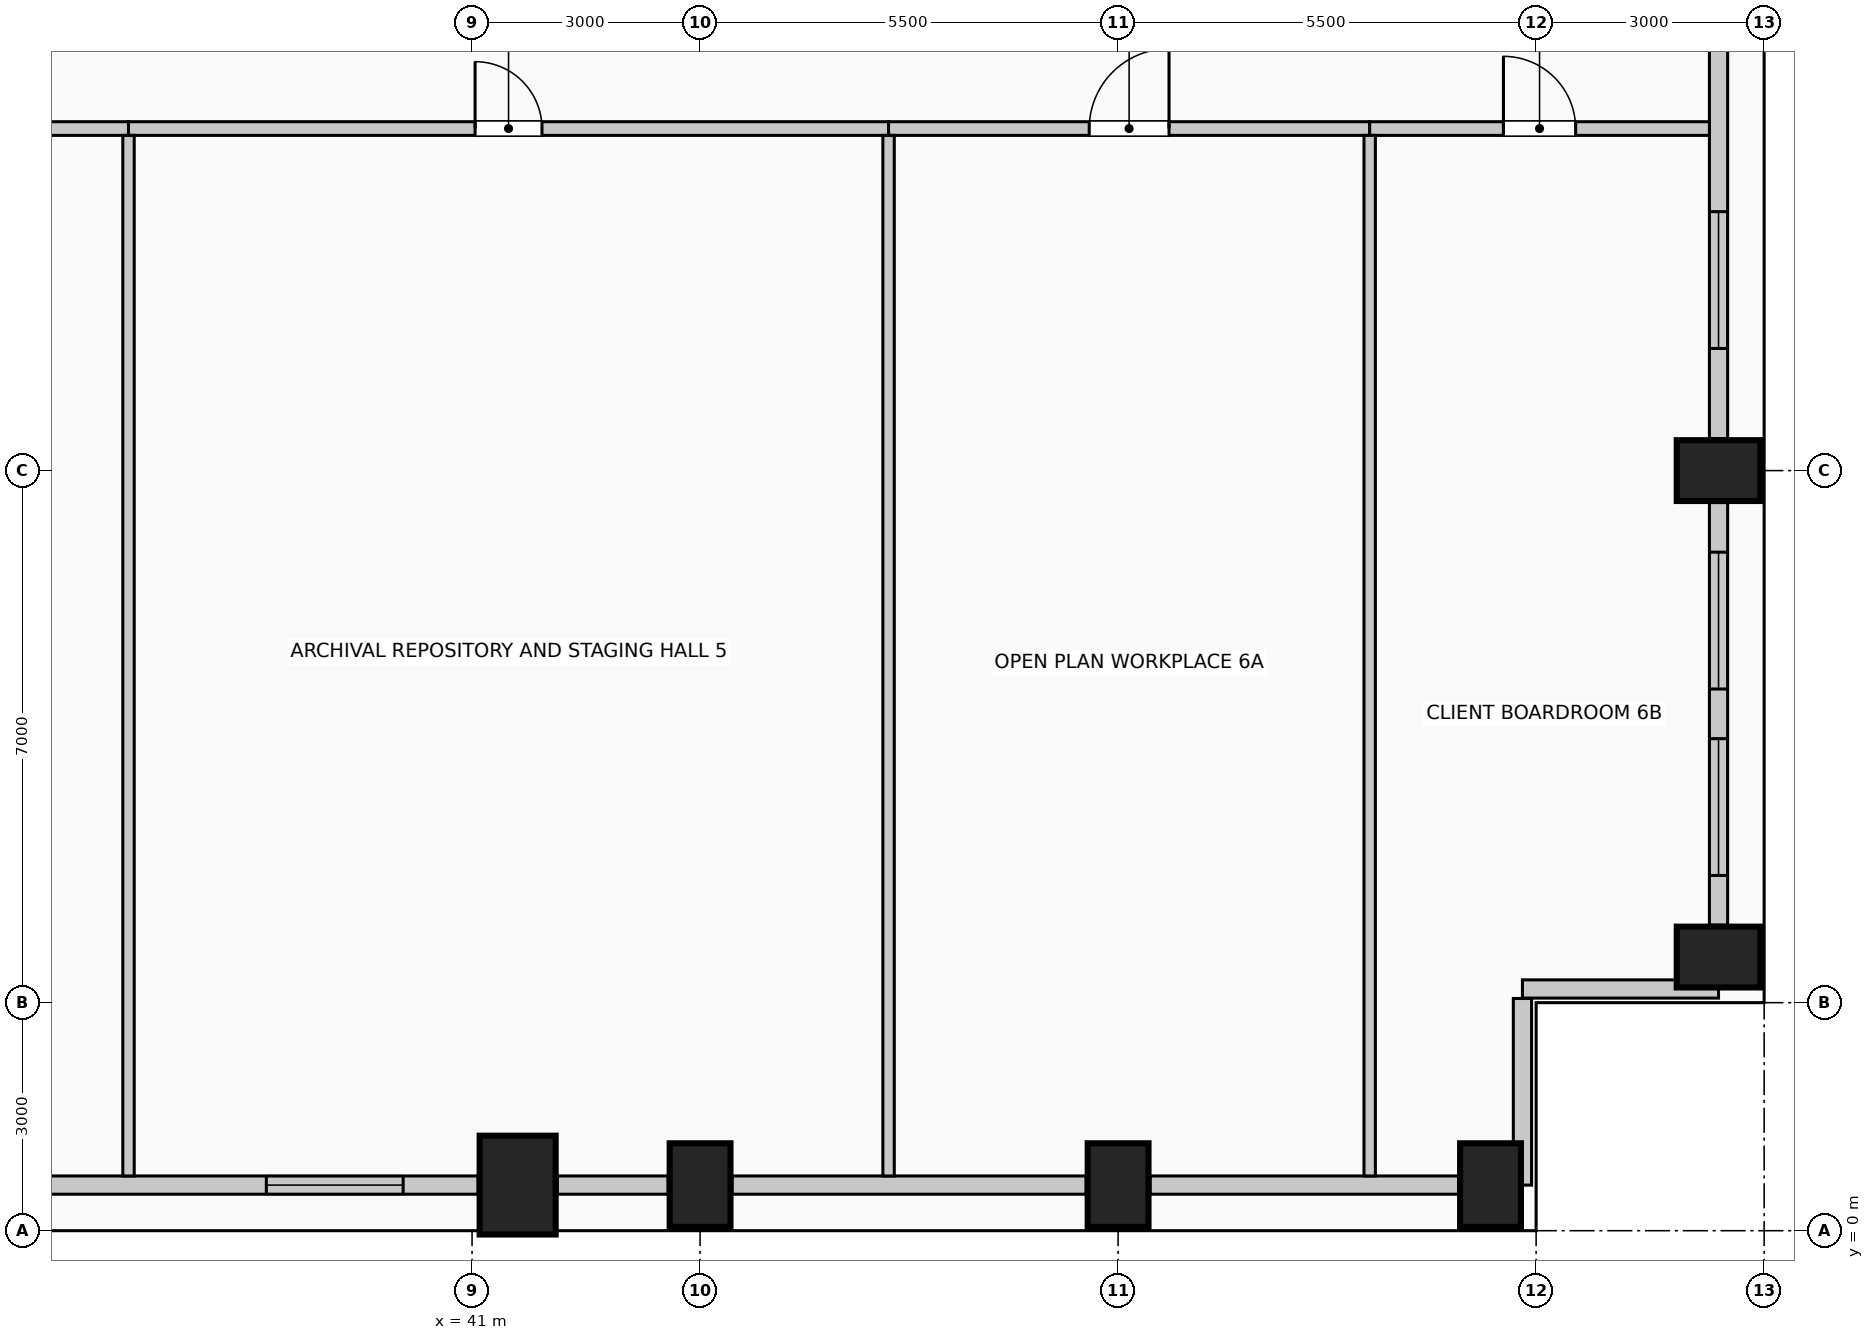
"""IFC4 building model, lengths in metres.
Left out: names, types, materials, properties, quantities, classifications, styles, units other than length and angle.
Written with IfcOpenShell. Run it as: python <this file> out.ifc"""

import sys

from ifc_helpers import new_model, si_unit, direction, frame, frame_2d, origin, origin_2d, place, context, subcontext, project, spatial, rectangle, extrude, element, fill, save


model = new_model("IFC4")
c1 = context("Model", 3, precision=1e-05, world=origin(), true_north=direction((0.0, 1.0)))
c2 = subcontext(c1, "Body", "Model", "MODEL_VIEW")
j1 = project(units=[si_unit("LENGTHUNIT", "METRE"), si_unit("PLANEANGLEUNIT", "RADIAN")], contexts=[c1])
p1 = place(None, origin())
s1 = spatial("IfcSite", under=j1, at=p1, CompositionType="ELEMENT")
p2 = place(p1, origin())
s2 = spatial("IfcBuilding", under=s1, at=p2, CompositionType="ELEMENT")
p3 = place(p2, frame((0.0, 0.0, 206.6)))
s3 = spatial("IfcBuildingStorey", under=s2, at=p3, CompositionType="ELEMENT", Elevation=206.6)
p4 = place(p3, frame((41.6, 0.6, 0.0), z_axis=(0.0, 0.0, 1.0), x_axis=(1.0, 0.0, 0.0)))
e1 = element("IfcColumn", 1, at=p4, inside=s3, PredefinedType="COLUMN", context=c2, shape_type="SweptSolid", body=[
    extrude(rectangle(XDim=1.0, YDim=1.3, at=origin_2d()), origin(), (0.0, 0.0, 1.0), 4.0),
])
for number, where, z_axis, x_axis in (
    (2, (44.0, 0.6, 0.0), (0.0, 0.0, 1.0), (1.0, 0.0, 0.0)),
    (3, (49.5, 0.6, 0.0), (0.0, 0.0, 1.0), (1.0, 0.0, 0.0)),
    (4, (54.4, 0.6, 0.0), (0.0, 0.0, 1.0), (1.0, 0.0, 0.0)),
    (5, (57.4, 3.6, 0.0), (0.0, 0.0, 1.0), (0.0, 1.0, 0.0)),
    (6, (57.4, 10.0, 0.0), (0.0, 0.0, 1.0), (0.0, 1.0, 0.0)),
):
    element("IfcColumn", number, at=place(p3, frame(where, z_axis=z_axis, x_axis=x_axis)), inside=s3, PredefinedType="COLUMN", context=c2, shape_type="SweptSolid", body=[
        extrude(rectangle(XDim=0.8, YDim=1.1, at=origin_2d()), origin(), (0.0, 0.0, 1.0), 4.0),
    ])
p5 = place(p3, frame((41.08, 0.6, 0.0), z_axis=(0.0, 0.0, 1.0), x_axis=(-1.0, 0.0, 0.0)))
e7 = element("IfcWall", 7, at=p5, inside=s3, PredefinedType="SOLIDWALL", context=c2, shape_type="SweptSolid", body=[
    extrude(rectangle(XDim=6.56, YDim=0.24, at=frame_2d((3.28, 0.0))), origin(), (0.0, 0.0, 1.0), 3.0),
])
p6 = place(p5, frame((0.987, 0.0, 0.42)))
e8 = element("IfcOpeningElement", 8, at=p6, cuts=e7, PredefinedType="OPENING", context=c2, shape_type="SweptSolid", body=[
    extrude(rectangle(XDim=1.8, YDim=2.2, at=frame_2d((0.9, 1.1))), frame((0.0, 0.13, 0.0), z_axis=(0.0, -1.0, 0.0), x_axis=(1.0, 0.0, 0.0)), (0.0, 0.0, 1.0), 0.26),
])
p7 = place(p3, frame((43.58, 0.6, 0.0), z_axis=(0.0, 0.0, 1.0), x_axis=(-1.0, 0.0, 0.0)))
e9 = element("IfcWall", 9, at=p7, inside=s3, PredefinedType="SOLIDWALL", context=c2, shape_type="SweptSolid", body=[
    extrude(rectangle(XDim=1.46, YDim=0.24, at=frame_2d((0.73, 0.0))), origin(), (0.0, 0.0, 1.0), 3.0),
])
p8 = place(p3, frame((49.08, 0.6, 0.0), z_axis=(0.0, 0.0, 1.0), x_axis=(-1.0, 0.0, 0.0)))
e10 = element("IfcWall", 10, at=p8, inside=s3, PredefinedType="SOLIDWALL", context=c2, shape_type="SweptSolid", body=[
    extrude(rectangle(XDim=4.66, YDim=0.24, at=frame_2d((2.33, 0.0))), origin(), (0.0, 0.0, 1.0), 3.0),
])
p9 = place(p3, frame((53.98, 0.6, 0.0), z_axis=(0.0, 0.0, 1.0), x_axis=(-1.0, 0.0, 0.0)))
e11 = element("IfcWall", 11, at=p9, inside=s3, PredefinedType="SOLIDWALL", context=c2, shape_type="SweptSolid", body=[
    extrude(rectangle(XDim=4.06, YDim=0.24, at=frame_2d((2.03, 0.0))), origin(), (0.0, 0.0, 1.0), 3.0),
])
p10 = place(p3, frame((57.4, 9.58, 0.0), z_axis=(0.0, 0.0, 1.0), x_axis=(0.0, -1.0, 0.0)))
e12 = element("IfcWall", 12, at=p10, inside=s3, PredefinedType="SOLIDWALL", context=c2, shape_type="SweptSolid", body=[
    extrude(rectangle(XDim=5.56, YDim=0.24, at=frame_2d((2.78, 0.0))), origin(), (0.0, 0.0, 1.0), 3.0),
])
p11 = place(p10, frame((0.653, 0.0, 0.42)))
e13 = element("IfcOpeningElement", 13, at=p11, cuts=e12, PredefinedType="OPENING", context=c2, shape_type="SweptSolid", body=[
    extrude(rectangle(XDim=1.8, YDim=2.2, at=frame_2d((0.9, 1.1))), frame((0.0, 0.13, 0.0), z_axis=(0.0, -1.0, 0.0), x_axis=(1.0, 0.0, 0.0)), (0.0, 0.0, 1.0), 0.26),
])
p12 = place(p10, frame((3.107, 0.0, 0.42)))
e14 = element("IfcOpeningElement", 14, at=p12, cuts=e12, PredefinedType="OPENING", context=c2, shape_type="SweptSolid", body=[
    extrude(rectangle(XDim=1.8, YDim=2.2, at=frame_2d((0.9, 1.1))), frame((0.0, 0.13, 0.0), z_axis=(0.0, -1.0, 0.0), x_axis=(1.0, 0.0, 0.0)), (0.0, 0.0, 1.0), 0.26),
])
p13 = place(p3, frame((57.4, 17.58, 0.0), z_axis=(0.0, 0.0, 1.0), x_axis=(0.0, -1.0, 0.0)))
e15 = element("IfcWall", 15, at=p13, inside=s3, PredefinedType="SOLIDWALL", context=c2, shape_type="SweptSolid", body=[
    extrude(rectangle(XDim=7.16, YDim=0.24, at=frame_2d((3.58, 0.0))), origin(), (0.0, 0.0, 1.0), 3.0),
])
p14 = place(p13, frame((4.173, 0.0, 0.42)))
e16 = element("IfcOpeningElement", 16, at=p14, cuts=e15, PredefinedType="OPENING", context=c2, shape_type="SweptSolid", body=[
    extrude(rectangle(XDim=1.8, YDim=2.2, at=frame_2d((0.9, 1.1))), frame((0.0, 0.13, 0.0), z_axis=(0.0, -1.0, 0.0), x_axis=(1.0, 0.0, 0.0)), (0.0, 0.0, 1.0), 0.26),
])
p15 = place(p3, frame((57.4, 3.18, 0.0), z_axis=(0.0, 0.0, 1.0), x_axis=(-1.0, 0.0, 0.0)))
e17 = element("IfcWall", 17, at=p15, inside=s3, PredefinedType="SOLIDWALL", context=c2, shape_type="SweptSolid", body=[
    extrude(rectangle(XDim=2.58, YDim=0.24, at=frame_2d((1.29, 0.0))), origin(), (0.0, 0.0, 1.0), 3.75),
])
p16 = place(p3, frame((54.82, 3.055, 0.0), z_axis=(0.0, 0.0, 1.0), x_axis=(0.0, -1.0, 0.0)))
e18 = element("IfcWall", 18, at=p16, inside=s3, PredefinedType="SOLIDWALL", context=c2, shape_type="SweptSolid", body=[
    extrude(rectangle(XDim=2.455, YDim=0.24, at=frame_2d((1.228, 0.0))), origin(), (0.0, 0.0, 1.0), 3.75),
])
p17 = place(p3, frame((23.1, 14.5, 0.0), z_axis=(0.0, 0.0, 1.0), x_axis=(1.0, 0.0, 0.0)))
e19 = element("IfcWall", 19, at=p17, inside=s3, PredefinedType="PARTITIONING", context=c2, shape_type="SweptSolid", body=[
    extrude(rectangle(XDim=13.38, YDim=0.18, at=frame_2d((6.69, 0.0))), origin(), (0.0, 0.0, 1.0), 3.75),
])
p18 = place(p17, frame((6.165, 0.0, 0.0)))
e20 = element("IfcOpeningElement", 20, at=p18, cuts=e19, PredefinedType="OPENING", context=c2, shape_type="SweptSolid", body=[
    extrude(rectangle(XDim=1.05, YDim=2.15, at=frame_2d((0.525, 1.075))), frame((0.0, 0.1, 0.0), z_axis=(0.0, -1.0, 0.0), x_axis=(1.0, 0.0, 0.0)), (0.0, 0.0, 1.0), 0.2),
])
p19 = place(p3, frame((36.48, 14.5, 0.0), z_axis=(0.0, 0.0, 1.0), x_axis=(1.0, 0.0, 0.0)))
e21 = element("IfcWall", 21, at=p19, inside=s3, PredefinedType="PARTITIONING", context=c2, shape_type="SweptSolid", body=[
    extrude(rectangle(XDim=10.0, YDim=0.18, at=frame_2d((5.0, 0.0))), origin(), (0.0, 0.0, 1.0), 3.75),
])
p20 = place(p19, frame((4.56, 0.0, 0.0)))
e22 = element("IfcOpeningElement", 22, at=p20, cuts=e21, PredefinedType="OPENING", context=c2, shape_type="SweptSolid", body=[
    extrude(rectangle(XDim=0.88, YDim=2.1, at=frame_2d((0.44, 1.05))), frame((0.0, 0.1, 0.0), z_axis=(0.0, -1.0, 0.0), x_axis=(1.0, 0.0, 0.0)), (0.0, 0.0, 1.0), 0.2),
])
p21 = place(p3, frame((46.48, 14.5, 0.0), z_axis=(0.0, 0.0, 1.0), x_axis=(1.0, 0.0, 0.0)))
e23 = element("IfcWall", 23, at=p21, inside=s3, PredefinedType="PARTITIONING", context=c2, shape_type="SweptSolid", body=[
    extrude(rectangle(XDim=6.33, YDim=0.18, at=frame_2d((3.165, 0.0))), origin(), (0.0, 0.0, 1.0), 3.75),
])
p22 = place(p21, frame((2.64, 0.0, 0.0)))
e24 = element("IfcOpeningElement", 24, at=p22, cuts=e23, PredefinedType="OPENING", context=c2, shape_type="SweptSolid", body=[
    extrude(rectangle(XDim=1.05, YDim=2.15, at=frame_2d((0.525, 1.075))), frame((0.0, 0.1, 0.0), z_axis=(0.0, -1.0, 0.0), x_axis=(1.0, 0.0, 0.0)), (0.0, 0.0, 1.0), 0.2),
])
p23 = place(p3, frame((52.81, 14.5, 0.0), z_axis=(0.0, 0.0, 1.0), x_axis=(1.0, 0.0, 0.0)))
e25 = element("IfcWall", 25, at=p23, inside=s3, PredefinedType="PARTITIONING", context=c2, shape_type="SweptSolid", body=[
    extrude(rectangle(XDim=4.47, YDim=0.18, at=frame_2d((2.235, 0.0))), origin(), (0.0, 0.0, 1.0), 3.75),
])
p24 = place(p23, frame((1.76, 0.0, 0.0)))
e26 = element("IfcOpeningElement", 26, at=p24, cuts=e25, PredefinedType="OPENING", context=c2, shape_type="SweptSolid", body=[
    extrude(rectangle(XDim=0.95, YDim=2.15, at=frame_2d((0.475, 1.075))), frame((0.0, 0.1, 0.0), z_axis=(0.0, -1.0, 0.0), x_axis=(1.0, 0.0, 0.0)), (0.0, 0.0, 1.0), 0.2),
])
for number, where, z_axis, x_axis in (
    (27, (36.48, 0.72, 0.0), (0.0, 0.0, 1.0), (0.0, 1.0, 0.0)),
    (28, (46.48, 0.72, 0.0), (0.0, 0.0, 1.0), (0.0, 1.0, 0.0)),
    (29, (52.81, 0.72, 0.0), (0.0, 0.0, 1.0), (0.0, 1.0, 0.0)),
):
    element("IfcWall", number, at=place(p3, frame(where, z_axis=z_axis, x_axis=x_axis)), inside=s3, PredefinedType="PARTITIONING", context=c2, shape_type="SweptSolid", body=[
        extrude(rectangle(XDim=13.69, YDim=0.15, at=frame_2d((6.845, 0.0))), origin(), (0.0, 0.0, 1.0), 3.75),
    ])
p25 = place(p6, origin())
e30 = element("IfcWindow", 30, at=p25, inside=s3, PartitioningType="SINGLE_PANEL", PredefinedType="WINDOW", context=c2, shape_type="SweptSolid", body=[
    extrude(rectangle(XDim=1.8, YDim=2.2, at=frame_2d((0.9, 1.1))), frame((0.0, 0.03, 0.0), z_axis=(0.0, -1.0, 0.0), x_axis=(1.0, 0.0, 0.0)), (0.0, 0.0, 1.0), 0.06),
])
fill(e8, e30)
p26 = place(p11, origin())
e31 = element("IfcWindow", 31, at=p26, inside=s3, PartitioningType="SINGLE_PANEL", PredefinedType="WINDOW", context=c2, shape_type="SweptSolid", body=[
    extrude(rectangle(XDim=1.8, YDim=2.2, at=frame_2d((0.9, 1.1))), frame((0.0, 0.03, 0.0), z_axis=(0.0, -1.0, 0.0), x_axis=(1.0, 0.0, 0.0)), (0.0, 0.0, 1.0), 0.06),
])
fill(e13, e31)
p27 = place(p12, origin())
e32 = element("IfcWindow", 32, at=p27, inside=s3, PartitioningType="SINGLE_PANEL", PredefinedType="WINDOW", context=c2, shape_type="SweptSolid", body=[
    extrude(rectangle(XDim=1.8, YDim=2.2, at=frame_2d((0.9, 1.1))), frame((0.0, 0.03, 0.0), z_axis=(0.0, -1.0, 0.0), x_axis=(1.0, 0.0, 0.0)), (0.0, 0.0, 1.0), 0.06),
])
fill(e14, e32)
p28 = place(p14, origin())
e33 = element("IfcWindow", 33, at=p28, inside=s3, PartitioningType="SINGLE_PANEL", PredefinedType="WINDOW", context=c2, shape_type="SweptSolid", body=[
    extrude(rectangle(XDim=1.8, YDim=2.2, at=frame_2d((0.9, 1.1))), frame((0.0, 0.03, 0.0), z_axis=(0.0, -1.0, 0.0), x_axis=(1.0, 0.0, 0.0)), (0.0, 0.0, 1.0), 0.06),
])
fill(e16, e33)
p29 = place(p20, origin())
e34 = element("IfcDoor", 34, at=p29, inside=s3, OperationType="SINGLE_SWING_LEFT", PredefinedType="DOOR", context=c2, shape_type="SweptSolid", body=[
    extrude(rectangle(XDim=0.88, YDim=2.1, at=frame_2d((0.44, 1.05))), frame((0.0, 0.025, 0.0), z_axis=(0.0, -1.0, 0.0), x_axis=(1.0, 0.0, 0.0)), (0.0, 0.0, 1.0), 0.05),
])
fill(e22, e34)
p30 = place(p22, origin())
e35 = element("IfcDoor", 35, at=p30, inside=s3, OperationType="SINGLE_SWING_RIGHT", PredefinedType="DOOR", context=c2, shape_type="SweptSolid", body=[
    extrude(rectangle(XDim=1.05, YDim=2.15, at=frame_2d((0.525, 1.075))), frame((0.0, 0.025, 0.0), z_axis=(0.0, -1.0, 0.0), x_axis=(1.0, 0.0, 0.0)), (0.0, 0.0, 1.0), 0.05),
])
fill(e24, e35)
p31 = place(p24, origin())
e36 = element("IfcDoor", 36, at=p31, inside=s3, OperationType="SINGLE_SWING_LEFT", PredefinedType="DOOR", context=c2, shape_type="SweptSolid", body=[
    extrude(rectangle(XDim=0.95, YDim=2.15, at=frame_2d((0.475, 1.075))), frame((0.0, 0.025, 0.0), z_axis=(0.0, -1.0, 0.0), x_axis=(1.0, 0.0, 0.0)), (0.0, 0.0, 1.0), 0.05),
])
fill(e26, e36)
save(model, sys.argv[1])
